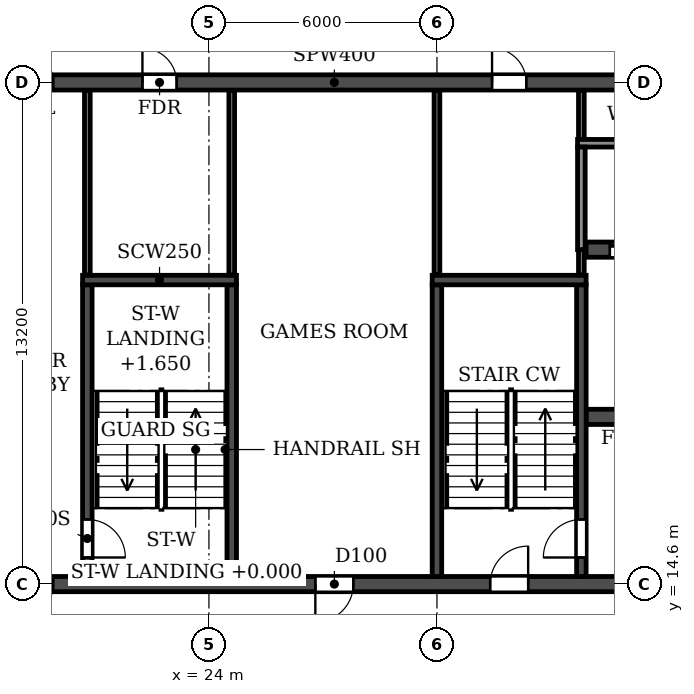
"""IFC4 building model, lengths in metres.
Left out: names, types, materials, properties, quantities, classifications, styles, units other than length and angle.
Written with IfcOpenShell. Run it as: python <this file> out.ifc"""

import sys

from ifc_helpers import new_model, si_unit, direction, frame, frame_2d, origin, place, context, subcontext, project, spatial, rectangle, extrude, element, fill, save


model = new_model("IFC4")
c1 = context("Model", 3, precision=1e-05, world=origin(), true_north=direction((0.0, 1.0)))
c2 = subcontext(c1, "Body", "Model", "MODEL_VIEW")
j1 = project(units=[si_unit("LENGTHUNIT", "METRE"), si_unit("PLANEANGLEUNIT", "RADIAN")], contexts=[c1])
p1 = place(None, origin())
s1 = spatial("IfcSite", under=j1, at=p1, CompositionType="ELEMENT")
p2 = place(p1, origin())
s2 = spatial("IfcBuilding", under=s1, at=p2, CompositionType="ELEMENT")
p3 = place(p2, frame((0.0, 0.0, 208.2)))
s3 = spatial("IfcBuildingStorey", under=s2, at=p3, CompositionType="ELEMENT", Elevation=208.2)
p4 = place(p3, frame((18.2, 14.6, 0.0), z_axis=(0.0, 0.0, 1.0), x_axis=(1.0, 0.0, 0.0)))
e1 = element("IfcWall", 1, at=p4, inside=s3, PredefinedType="SOLIDWALL", context=c2, shape_type="SweptSolid", body=[
    extrude(rectangle(XDim=65.6, YDim=0.4, at=frame_2d((32.8, 0.0))), origin(), (0.0, 0.0, 1.0), 3.0),
])
p5 = place(p4, frame((0.7, 0.0, 0.0)))
e2 = element("IfcOpeningElement", 2, at=p5, cuts=e1, PredefinedType="OPENING", context=c2, shape_type="SweptSolid", body=[
    extrude(rectangle(XDim=1.0, YDim=2.1, at=frame_2d((0.5, 1.05))), frame((0.0, 0.21, 0.0), z_axis=(0.0, -1.0, 0.0), x_axis=(1.0, 0.0, 0.0)), (0.0, 0.0, 1.0), 0.42),
])
p6 = place(p4, frame((8.6, 0.0, 0.0)))
e3 = element("IfcOpeningElement", 3, at=p6, cuts=e1, PredefinedType="OPENING", context=c2, shape_type="SweptSolid", body=[
    extrude(rectangle(XDim=1.0, YDim=2.1, at=frame_2d((0.5, 1.05))), frame((0.0, 0.21, 0.0), z_axis=(0.0, -1.0, 0.0), x_axis=(1.0, 0.0, 0.0)), (0.0, 0.0, 1.0), 0.42),
])
p7 = place(p4, frame((13.2, 0.0, 0.0)))
e4 = element("IfcOpeningElement", 4, at=p7, cuts=e1, PredefinedType="OPENING", context=c2, shape_type="SweptSolid", body=[
    extrude(rectangle(XDim=1.0, YDim=2.1, at=frame_2d((0.5, 1.05))), frame((0.0, 0.21, 0.0), z_axis=(0.0, -1.0, 0.0), x_axis=(1.0, 0.0, 0.0)), (0.0, 0.0, 1.0), 0.42),
])
p8 = place(p4, frame((27.1, 0.0, 0.0)))
e5 = element("IfcOpeningElement", 5, at=p8, cuts=e1, PredefinedType="OPENING", context=c2, shape_type="SweptSolid", body=[
    extrude(rectangle(XDim=1.0, YDim=2.1, at=frame_2d((0.5, 1.05))), frame((0.0, 0.21, 0.0), z_axis=(0.0, -1.0, 0.0), x_axis=(1.0, 0.0, 0.0)), (0.0, 0.0, 1.0), 0.42),
])
p9 = place(p4, frame((32.3, 0.0, 0.0)))
e6 = element("IfcOpeningElement", 6, at=p9, cuts=e1, PredefinedType="OPENING", context=c2, shape_type="SweptSolid", body=[
    extrude(rectangle(XDim=1.0, YDim=2.1, at=frame_2d((0.5, 1.05))), frame((0.0, 0.21, 0.0), z_axis=(0.0, -1.0, 0.0), x_axis=(1.0, 0.0, 0.0)), (0.0, 0.0, 1.0), 0.42),
])
p10 = place(p4, frame((34.9, 0.0, 0.0)))
e7 = element("IfcOpeningElement", 7, at=p10, cuts=e1, PredefinedType="OPENING", context=c2, shape_type="SweptSolid", body=[
    extrude(rectangle(XDim=1.0, YDim=2.1, at=frame_2d((0.5, 1.05))), frame((0.0, 0.21, 0.0), z_axis=(0.0, -1.0, 0.0), x_axis=(1.0, 0.0, 0.0)), (0.0, 0.0, 1.0), 0.42),
])
p11 = place(p4, frame((38.8, 0.0, 0.0)))
e8 = element("IfcOpeningElement", 8, at=p11, cuts=e1, PredefinedType="OPENING", context=c2, shape_type="SweptSolid", body=[
    extrude(rectangle(XDim=1.0, YDim=2.1, at=frame_2d((0.5, 1.05))), frame((0.0, 0.21, 0.0), z_axis=(0.0, -1.0, 0.0), x_axis=(1.0, 0.0, 0.0)), (0.0, 0.0, 1.0), 0.42),
])
p12 = place(p4, frame((51.4, 0.0, 0.0)))
e9 = element("IfcOpeningElement", 9, at=p12, cuts=e1, PredefinedType="OPENING", context=c2, shape_type="SweptSolid", body=[
    extrude(rectangle(XDim=1.0, YDim=2.1, at=frame_2d((0.5, 1.05))), frame((0.0, 0.21, 0.0), z_axis=(0.0, -1.0, 0.0), x_axis=(1.0, 0.0, 0.0)), (0.0, 0.0, 1.0), 0.42),
])
p13 = place(p4, frame((56.0, 0.0, 0.0)))
e10 = element("IfcOpeningElement", 10, at=p13, cuts=e1, PredefinedType="OPENING", context=c2, shape_type="SweptSolid", body=[
    extrude(rectangle(XDim=1.0, YDim=2.1, at=frame_2d((0.5, 1.05))), frame((0.0, 0.21, 0.0), z_axis=(0.0, -1.0, 0.0), x_axis=(1.0, 0.0, 0.0)), (0.0, 0.0, 1.0), 0.42),
])
p14 = place(p4, frame((63.9, 0.0, 0.0)))
e11 = element("IfcOpeningElement", 11, at=p14, cuts=e1, PredefinedType="OPENING", context=c2, shape_type="SweptSolid", body=[
    extrude(rectangle(XDim=1.0, YDim=2.1, at=frame_2d((0.5, 1.05))), frame((0.0, 0.21, 0.0), z_axis=(0.0, -1.0, 0.0), x_axis=(1.0, 0.0, 0.0)), (0.0, 0.0, 1.0), 0.42),
])
p15 = place(p3, frame((18.2, 27.8, 0.0), z_axis=(0.0, 0.0, 1.0), x_axis=(1.0, 0.0, 0.0)))
e12 = element("IfcWall", 12, at=p15, inside=s3, PredefinedType="SOLIDWALL", context=c2, shape_type="SweptSolid", body=[
    extrude(rectangle(XDim=65.6, YDim=0.4, at=frame_2d((32.8, 0.0))), origin(), (0.0, 0.0, 1.0), 3.0),
])
p16 = place(p15, frame((0.7, 0.0, 0.0)))
e13 = element("IfcOpeningElement", 13, at=p16, cuts=e12, PredefinedType="OPENING", context=c2, shape_type="SweptSolid", body=[
    extrude(rectangle(XDim=1.0, YDim=2.1, at=frame_2d((0.5, 1.05))), frame((0.0, 0.21, 0.0), z_axis=(0.0, -1.0, 0.0), x_axis=(1.0, 0.0, 0.0)), (0.0, 0.0, 1.0), 0.42),
])
p17 = place(p15, frame((4.05, 0.0, 0.0)))
e14 = element("IfcOpeningElement", 14, at=p17, cuts=e12, PredefinedType="OPENING", context=c2, shape_type="SweptSolid", body=[
    extrude(rectangle(XDim=0.9, YDim=2.1, at=frame_2d((0.45, 1.05))), frame((0.0, 0.21, 0.0), z_axis=(0.0, -1.0, 0.0), x_axis=(1.0, 0.0, 0.0)), (0.0, 0.0, 1.0), 0.42),
])
p18 = place(p15, frame((13.25, 0.0, 0.0)))
e15 = element("IfcOpeningElement", 15, at=p18, cuts=e12, PredefinedType="OPENING", context=c2, shape_type="SweptSolid", body=[
    extrude(rectangle(XDim=0.9, YDim=2.1, at=frame_2d((0.45, 1.05))), frame((0.0, 0.21, 0.0), z_axis=(0.0, -1.0, 0.0), x_axis=(1.0, 0.0, 0.0)), (0.0, 0.0, 1.0), 0.42),
])
p19 = place(p15, frame((17.7, 0.0, 0.0)))
e16 = element("IfcOpeningElement", 16, at=p19, cuts=e12, PredefinedType="OPENING", context=c2, shape_type="SweptSolid", body=[
    extrude(rectangle(XDim=1.0, YDim=2.1, at=frame_2d((0.5, 1.05))), frame((0.0, 0.21, 0.0), z_axis=(0.0, -1.0, 0.0), x_axis=(1.0, 0.0, 0.0)), (0.0, 0.0, 1.0), 0.42),
])
p20 = place(p15, frame((22.9, 0.0, 0.0)))
e17 = element("IfcOpeningElement", 17, at=p20, cuts=e12, PredefinedType="OPENING", context=c2, shape_type="SweptSolid", body=[
    extrude(rectangle(XDim=1.0, YDim=2.1, at=frame_2d((0.5, 1.05))), frame((0.0, 0.21, 0.0), z_axis=(0.0, -1.0, 0.0), x_axis=(1.0, 0.0, 0.0)), (0.0, 0.0, 1.0), 0.42),
])
p21 = place(p15, frame((29.4, 0.0, 0.0)))
e18 = element("IfcOpeningElement", 18, at=p21, cuts=e12, PredefinedType="OPENING", context=c2, shape_type="SweptSolid", body=[
    extrude(rectangle(XDim=1.0, YDim=2.1, at=frame_2d((0.5, 1.05))), frame((0.0, 0.21, 0.0), z_axis=(0.0, -1.0, 0.0), x_axis=(1.0, 0.0, 0.0)), (0.0, 0.0, 1.0), 0.42),
])
p22 = place(p15, frame((32.3, 0.0, 0.0)))
e19 = element("IfcOpeningElement", 19, at=p22, cuts=e12, PredefinedType="OPENING", context=c2, shape_type="SweptSolid", body=[
    extrude(rectangle(XDim=1.0, YDim=2.1, at=frame_2d((0.5, 1.05))), frame((0.0, 0.21, 0.0), z_axis=(0.0, -1.0, 0.0), x_axis=(1.0, 0.0, 0.0)), (0.0, 0.0, 1.0), 0.42),
])
p23 = place(p15, frame((35.2, 0.0, 0.0)))
e20 = element("IfcOpeningElement", 20, at=p23, cuts=e12, PredefinedType="OPENING", context=c2, shape_type="SweptSolid", body=[
    extrude(rectangle(XDim=1.0, YDim=2.1, at=frame_2d((0.5, 1.05))), frame((0.0, 0.21, 0.0), z_axis=(0.0, -1.0, 0.0), x_axis=(1.0, 0.0, 0.0)), (0.0, 0.0, 1.0), 0.42),
])
p24 = place(p15, frame((37.8, 0.0, 0.0)))
e21 = element("IfcOpeningElement", 21, at=p24, cuts=e12, PredefinedType="OPENING", context=c2, shape_type="SweptSolid", body=[
    extrude(rectangle(XDim=1.0, YDim=2.1, at=frame_2d((0.5, 1.05))), frame((0.0, 0.21, 0.0), z_axis=(0.0, -1.0, 0.0), x_axis=(1.0, 0.0, 0.0)), (0.0, 0.0, 1.0), 0.42),
])
p25 = place(p15, frame((40.4, 0.0, 0.0)))
e22 = element("IfcOpeningElement", 22, at=p25, cuts=e12, PredefinedType="OPENING", context=c2, shape_type="SweptSolid", body=[
    extrude(rectangle(XDim=1.0, YDim=2.1, at=frame_2d((0.5, 1.05))), frame((0.0, 0.21, 0.0), z_axis=(0.0, -1.0, 0.0), x_axis=(1.0, 0.0, 0.0)), (0.0, 0.0, 1.0), 0.42),
])
p26 = place(p15, frame((43.0, 0.0, 0.0)))
e23 = element("IfcOpeningElement", 23, at=p26, cuts=e12, PredefinedType="OPENING", context=c2, shape_type="SweptSolid", body=[
    extrude(rectangle(XDim=1.0, YDim=2.1, at=frame_2d((0.5, 1.05))), frame((0.0, 0.21, 0.0), z_axis=(0.0, -1.0, 0.0), x_axis=(1.0, 0.0, 0.0)), (0.0, 0.0, 1.0), 0.42),
])
p27 = place(p15, frame((46.9, 0.0, 0.0)))
e24 = element("IfcOpeningElement", 24, at=p27, cuts=e12, PredefinedType="OPENING", context=c2, shape_type="SweptSolid", body=[
    extrude(rectangle(XDim=1.0, YDim=2.1, at=frame_2d((0.5, 1.05))), frame((0.0, 0.21, 0.0), z_axis=(0.0, -1.0, 0.0), x_axis=(1.0, 0.0, 0.0)), (0.0, 0.0, 1.0), 0.42),
])
p28 = place(p15, frame((51.45, 0.0, 0.0)))
e25 = element("IfcOpeningElement", 25, at=p28, cuts=e12, PredefinedType="OPENING", context=c2, shape_type="SweptSolid", body=[
    extrude(rectangle(XDim=0.9, YDim=2.1, at=frame_2d((0.45, 1.05))), frame((0.0, 0.21, 0.0), z_axis=(0.0, -1.0, 0.0), x_axis=(1.0, 0.0, 0.0)), (0.0, 0.0, 1.0), 0.42),
])
p29 = place(p15, frame((60.65, 0.0, 0.0)))
e26 = element("IfcOpeningElement", 26, at=p29, cuts=e12, PredefinedType="OPENING", context=c2, shape_type="SweptSolid", body=[
    extrude(rectangle(XDim=0.9, YDim=2.1, at=frame_2d((0.45, 1.05))), frame((0.0, 0.21, 0.0), z_axis=(0.0, -1.0, 0.0), x_axis=(1.0, 0.0, 0.0)), (0.0, 0.0, 1.0), 0.42),
])
p30 = place(p15, frame((63.9, 0.0, 0.0)))
e27 = element("IfcOpeningElement", 27, at=p30, cuts=e12, PredefinedType="OPENING", context=c2, shape_type="SweptSolid", body=[
    extrude(rectangle(XDim=1.0, YDim=2.1, at=frame_2d((0.5, 1.05))), frame((0.0, 0.21, 0.0), z_axis=(0.0, -1.0, 0.0), x_axis=(1.0, 0.0, 0.0)), (0.0, 0.0, 1.0), 0.42),
])
p31 = place(p3, frame((33.925, 19.0, 0.0), z_axis=(0.0, 0.0, 1.0), x_axis=(1.0, 0.0, 0.0)))
e28 = element("IfcWall", 28, at=p31, inside=s3, PredefinedType="SOLIDWALL", context=c2, shape_type="SweptSolid", body=[
    extrude(rectangle(XDim=34.15, YDim=0.4, at=frame_2d((17.075, 0.0))), origin(), (0.0, 0.0, 1.0), 3.0),
])
p32 = place(p31, frame((16.175, 0.0, 0.0)))
e29 = element("IfcOpeningElement", 29, at=p32, cuts=e28, PredefinedType="OPENING", context=c2, shape_type="SweptSolid", body=[
    extrude(rectangle(XDim=1.8, YDim=2.1, at=frame_2d((0.9, 1.05))), frame((0.0, 0.21, 0.0), z_axis=(0.0, -1.0, 0.0), x_axis=(1.0, 0.0, 0.0)), (0.0, 0.0, 1.0), 0.42),
])
p33 = place(p31, frame((1.525, 0.0, 0.0)))
e30 = element("IfcOpeningElement", 30, at=p33, cuts=e28, PredefinedType="OPENING", context=c2, shape_type="SweptSolid", body=[
    extrude(rectangle(XDim=1.8, YDim=2.1, at=frame_2d((0.9, 1.05))), frame((0.0, 0.21, 0.0), z_axis=(0.0, -1.0, 0.0), x_axis=(1.0, 0.0, 0.0)), (0.0, 0.0, 1.0), 0.42),
])
p34 = place(p31, frame((30.825, 0.0, 0.0)))
e31 = element("IfcOpeningElement", 31, at=p34, cuts=e28, PredefinedType="OPENING", context=c2, shape_type="SweptSolid", body=[
    extrude(rectangle(XDim=1.8, YDim=2.1, at=frame_2d((0.9, 1.05))), frame((0.0, 0.21, 0.0), z_axis=(0.0, -1.0, 0.0), x_axis=(1.0, 0.0, 0.0)), (0.0, 0.0, 1.0), 0.42),
])
p35 = place(p3, frame((33.925, 23.4, 0.0), z_axis=(0.0, 0.0, 1.0), x_axis=(1.0, 0.0, 0.0)))
e32 = element("IfcWall", 32, at=p35, inside=s3, PredefinedType="SOLIDWALL", context=c2, shape_type="SweptSolid", body=[
    extrude(rectangle(XDim=34.15, YDim=0.4, at=frame_2d((17.075, 0.0))), origin(), (0.0, 0.0, 1.0), 3.0),
])
p36 = place(p35, frame((16.175, 0.0, 0.0)))
e33 = element("IfcOpeningElement", 33, at=p36, cuts=e32, PredefinedType="OPENING", context=c2, shape_type="SweptSolid", body=[
    extrude(rectangle(XDim=1.8, YDim=2.1, at=frame_2d((0.9, 1.05))), frame((0.0, 0.21, 0.0), z_axis=(0.0, -1.0, 0.0), x_axis=(1.0, 0.0, 0.0)), (0.0, 0.0, 1.0), 0.42),
])
p37 = place(p35, frame((0.625, 0.0, 0.0)))
e34 = element("IfcOpeningElement", 34, at=p37, cuts=e32, PredefinedType="OPENING", context=c2, shape_type="SweptSolid", body=[
    extrude(rectangle(XDim=1.1, YDim=2.1, at=frame_2d((0.55, 1.05))), frame((0.0, 0.21, 0.0), z_axis=(0.0, -1.0, 0.0), x_axis=(1.0, 0.0, 0.0)), (0.0, 0.0, 1.0), 0.42),
])
p38 = place(p35, frame((3.225, 0.0, 0.0)))
e35 = element("IfcOpeningElement", 35, at=p38, cuts=e32, PredefinedType="OPENING", context=c2, shape_type="SweptSolid", body=[
    extrude(rectangle(XDim=1.1, YDim=2.1, at=frame_2d((0.55, 1.05))), frame((0.0, 0.21, 0.0), z_axis=(0.0, -1.0, 0.0), x_axis=(1.0, 0.0, 0.0)), (0.0, 0.0, 1.0), 0.42),
])
p39 = place(p35, frame((5.825, 0.0, 0.0)))
e36 = element("IfcOpeningElement", 36, at=p39, cuts=e32, PredefinedType="OPENING", context=c2, shape_type="SweptSolid", body=[
    extrude(rectangle(XDim=1.1, YDim=2.1, at=frame_2d((0.55, 1.05))), frame((0.0, 0.21, 0.0), z_axis=(0.0, -1.0, 0.0), x_axis=(1.0, 0.0, 0.0)), (0.0, 0.0, 1.0), 0.42),
])
p40 = place(p35, frame((8.425, 0.0, 0.0)))
e37 = element("IfcOpeningElement", 37, at=p40, cuts=e32, PredefinedType="OPENING", context=c2, shape_type="SweptSolid", body=[
    extrude(rectangle(XDim=1.1, YDim=2.1, at=frame_2d((0.55, 1.05))), frame((0.0, 0.21, 0.0), z_axis=(0.0, -1.0, 0.0), x_axis=(1.0, 0.0, 0.0)), (0.0, 0.0, 1.0), 0.42),
])
p41 = place(p35, frame((11.025, 0.0, 0.0)))
e38 = element("IfcOpeningElement", 38, at=p41, cuts=e32, PredefinedType="OPENING", context=c2, shape_type="SweptSolid", body=[
    extrude(rectangle(XDim=1.1, YDim=2.1, at=frame_2d((0.55, 1.05))), frame((0.0, 0.21, 0.0), z_axis=(0.0, -1.0, 0.0), x_axis=(1.0, 0.0, 0.0)), (0.0, 0.0, 1.0), 0.42),
])
p42 = place(p35, frame((13.625, 0.0, 0.0)))
e39 = element("IfcOpeningElement", 39, at=p42, cuts=e32, PredefinedType="OPENING", context=c2, shape_type="SweptSolid", body=[
    extrude(rectangle(XDim=1.1, YDim=2.1, at=frame_2d((0.55, 1.05))), frame((0.0, 0.21, 0.0), z_axis=(0.0, -1.0, 0.0), x_axis=(1.0, 0.0, 0.0)), (0.0, 0.0, 1.0), 0.42),
])
p43 = place(p35, frame((27.225, 0.0, 0.0)))
e40 = element("IfcOpeningElement", 40, at=p43, cuts=e32, PredefinedType="OPENING", context=c2, shape_type="SweptSolid", body=[
    extrude(rectangle(XDim=1.1, YDim=2.1, at=frame_2d((0.55, 1.05))), frame((0.0, 0.21, 0.0), z_axis=(0.0, -1.0, 0.0), x_axis=(1.0, 0.0, 0.0)), (0.0, 0.0, 1.0), 0.42),
])
p44 = place(p3, frame((30.0, 14.8, 0.0), z_axis=(0.0, 0.0, 1.0), x_axis=(0.0, 1.0, 0.0)))
e41 = element("IfcWall", 41, at=p44, inside=s3, PredefinedType="SOLIDWALL", context=c2, shape_type="SweptSolid", body=[
    extrude(rectangle(XDim=7.675, YDim=0.25, at=frame_2d((3.837, 0.0))), origin(), (0.0, 0.0, 1.0), 3.0),
])
p45 = place(p3, frame((33.8, 14.8, 0.0), z_axis=(0.0, 0.0, 1.0), x_axis=(0.0, 1.0, 0.0)))
e42 = element("IfcWall", 42, at=p45, inside=s3, PredefinedType="SOLIDWALL", context=c2, shape_type="SweptSolid", body=[
    extrude(rectangle(XDim=7.675, YDim=0.25, at=frame_2d((3.837, 0.0))), origin(), (0.0, 0.0, 1.0), 3.0),
])
p46 = place(p45, frame((0.5, 0.0, 0.0)))
e43 = element("IfcOpeningElement", 43, at=p46, cuts=e42, PredefinedType="OPENING", context=c2, shape_type="SweptSolid", body=[
    extrude(rectangle(XDim=1.0, YDim=2.1, at=frame_2d((0.5, 1.05))), frame((0.0, 0.135, 0.0), z_axis=(0.0, -1.0, 0.0), x_axis=(1.0, 0.0, 0.0)), (0.0, 0.0, 1.0), 0.27),
])
p47 = place(p3, frame((29.875, 22.6, 0.0), z_axis=(0.0, 0.0, 1.0), x_axis=(1.0, 0.0, 0.0)))
e44 = element("IfcWall", 44, at=p47, inside=s3, PredefinedType="SOLIDWALL", context=c2, shape_type="SweptSolid", body=[
    extrude(rectangle(XDim=4.05, YDim=0.25, at=frame_2d((2.025, 0.0))), origin(), (0.0, 0.0, 1.0), 3.0),
])
p48 = place(p3, frame((20.8, 14.8, 0.0), z_axis=(0.0, 0.0, 1.0), x_axis=(0.0, 1.0, 0.0)))
e45 = element("IfcWall", 45, at=p48, inside=s3, PredefinedType="SOLIDWALL", context=c2, shape_type="SweptSolid", body=[
    extrude(rectangle(XDim=7.675, YDim=0.25, at=frame_2d((3.837, 0.0))), origin(), (0.0, 0.0, 1.0), 3.0),
])
p49 = place(p48, frame((0.5, 0.0, 0.0)))
e46 = element("IfcOpeningElement", 46, at=p49, cuts=e45, PredefinedType="OPENING", context=c2, shape_type="SweptSolid", body=[
    extrude(rectangle(XDim=1.0, YDim=2.1, at=frame_2d((0.5, 1.05))), frame((0.0, 0.135, 0.0), z_axis=(0.0, -1.0, 0.0), x_axis=(1.0, 0.0, 0.0)), (0.0, 0.0, 1.0), 0.27),
])
p50 = place(p3, frame((24.6, 14.8, 0.0), z_axis=(0.0, 0.0, 1.0), x_axis=(0.0, 1.0, 0.0)))
e47 = element("IfcWall", 47, at=p50, inside=s3, PredefinedType="SOLIDWALL", context=c2, shape_type="SweptSolid", body=[
    extrude(rectangle(XDim=7.675, YDim=0.25, at=frame_2d((3.837, 0.0))), origin(), (0.0, 0.0, 1.0), 3.0),
])
p51 = place(p3, frame((20.675, 22.6, 0.0), z_axis=(0.0, 0.0, 1.0), x_axis=(1.0, 0.0, 0.0)))
e48 = element("IfcWall", 48, at=p51, inside=s3, PredefinedType="SOLIDWALL", context=c2, shape_type="SweptSolid", body=[
    extrude(rectangle(XDim=4.05, YDim=0.25, at=frame_2d((2.025, 0.0))), origin(), (0.0, 0.0, 1.0), 3.0),
])
for number, where, z_axis, x_axis in (
    (49, (20.8, 22.735, 0.0), (0.0, 0.0, 1.0), (0.0, 1.0, 0.0)),
    (50, (24.6, 22.735, 0.0), (0.0, 0.0, 1.0), (0.0, 1.0, 0.0)),
    (51, (30.0, 22.735, 0.0), (0.0, 0.0, 1.0), (0.0, 1.0, 0.0)),
):
    element("IfcWall", number, at=place(p3, frame(where, z_axis=z_axis, x_axis=x_axis)), inside=s3, PredefinedType="PARTITIONING", context=c2, shape_type="SweptSolid", body=[
        extrude(rectangle(XDim=4.855, YDim=0.15, at=frame_2d((2.427, 0.0))), origin(), (0.0, 0.0, 1.0), 3.0),
    ])
p52 = place(p3, frame((33.8, 22.735, 0.0), z_axis=(0.0, 0.0, 1.0), x_axis=(0.0, 1.0, 0.0)))
e52 = element("IfcWall", 52, at=p52, inside=s3, PredefinedType="PARTITIONING", context=c2, shape_type="SweptSolid", body=[
    extrude(rectangle(XDim=0.665, YDim=0.15, at=frame_2d((0.333, 0.0))), origin(), (0.0, 0.0, 1.0), 3.0),
])
p53 = place(p3, frame((33.8, 26.3, 0.0), z_axis=(0.0, 0.0, 1.0), x_axis=(0.0, 1.0, 0.0)))
e53 = element("IfcWall", 53, at=p53, inside=s3, PredefinedType="PARTITIONING", context=c2, shape_type="SweptSolid", body=[
    extrude(rectangle(XDim=1.29, YDim=0.15, at=frame_2d((0.645, 0.0))), origin(), (0.0, 0.0, 1.0), 3.0),
])
p54 = place(p3, frame((33.7, 26.2, 0.0), z_axis=(0.0, 0.0, 1.0), x_axis=(1.0, 0.0, 0.0)))
e54 = element("IfcWall", 54, at=p54, inside=s3, PredefinedType="PARTITIONING", context=c2, shape_type="SweptSolid", body=[
    extrude(rectangle(XDim=10.4, YDim=0.2, at=frame_2d((5.2, 0.0))), origin(), (0.0, 0.0, 1.0), 3.0),
])
p55 = place(p3, frame((33.8, 23.4, 0.0), z_axis=(0.0, 0.0, 1.0), x_axis=(0.0, 1.0, 0.0)))
e55 = element("IfcWall", 55, at=p55, inside=s3, PredefinedType="PARTITIONING", context=c2, shape_type="SweptSolid", body=[
    extrude(rectangle(XDim=2.7, YDim=0.2, at=frame_2d((1.35, 0.0))), origin(), (0.0, 0.0, 1.0), 3.0),
])
p56 = place(p16, origin())
e56 = element("IfcDoor", 56, at=p56, inside=s3, OperationType="SINGLE_SWING_LEFT", PredefinedType="DOOR", context=c2, shape_type="SweptSolid", body=[
    extrude(rectangle(XDim=1.0, YDim=2.1, at=frame_2d((0.5, 1.05))), frame((0.0, 0.025, 0.0), z_axis=(0.0, -1.0, 0.0), x_axis=(1.0, 0.0, 0.0)), (0.0, 0.0, 1.0), 0.05),
])
fill(e13, e56)
p57 = place(p17, origin())
e57 = element("IfcDoor", 57, at=p57, inside=s3, OperationType="SINGLE_SWING_LEFT", PredefinedType="DOOR", context=c2, shape_type="SweptSolid", body=[
    extrude(rectangle(XDim=0.9, YDim=2.1, at=frame_2d((0.45, 1.05))), frame((0.0, 0.025, 0.0), z_axis=(0.0, -1.0, 0.0), x_axis=(1.0, 0.0, 0.0)), (0.0, 0.0, 1.0), 0.05),
])
fill(e14, e57)
p58 = place(p18, origin())
e58 = element("IfcDoor", 58, at=p58, inside=s3, OperationType="SINGLE_SWING_LEFT", PredefinedType="DOOR", context=c2, shape_type="SweptSolid", body=[
    extrude(rectangle(XDim=0.9, YDim=2.1, at=frame_2d((0.45, 1.05))), frame((0.0, 0.025, 0.0), z_axis=(0.0, -1.0, 0.0), x_axis=(1.0, 0.0, 0.0)), (0.0, 0.0, 1.0), 0.05),
])
fill(e15, e58)
p59 = place(p5, frame((1.0, 0.0, 0.0), z_axis=(0.0, 0.0, 1.0), x_axis=(-1.0, 0.0, 0.0)))
e59 = element("IfcDoor", 59, at=p59, inside=s3, OperationType="SINGLE_SWING_RIGHT", PredefinedType="DOOR", context=c2, shape_type="SweptSolid", body=[
    extrude(rectangle(XDim=1.0, YDim=2.1, at=frame_2d((0.5, 1.05))), frame((0.0, 0.025, 0.0), z_axis=(0.0, -1.0, 0.0), x_axis=(1.0, 0.0, 0.0)), (0.0, 0.0, 1.0), 0.05),
])
fill(e2, e59)
p60 = place(p6, frame((1.0, 0.0, 0.0), z_axis=(0.0, 0.0, 1.0), x_axis=(-1.0, 0.0, 0.0)))
e60 = element("IfcDoor", 60, at=p60, inside=s3, OperationType="SINGLE_SWING_RIGHT", PredefinedType="DOOR", context=c2, shape_type="SweptSolid", body=[
    extrude(rectangle(XDim=1.0, YDim=2.1, at=frame_2d((0.5, 1.05))), frame((0.0, 0.025, 0.0), z_axis=(0.0, -1.0, 0.0), x_axis=(1.0, 0.0, 0.0)), (0.0, 0.0, 1.0), 0.05),
])
fill(e3, e60)
p61 = place(p7, origin())
e61 = element("IfcDoor", 61, at=p61, inside=s3, OperationType="SINGLE_SWING_RIGHT", PredefinedType="DOOR", context=c2, shape_type="SweptSolid", body=[
    extrude(rectangle(XDim=1.0, YDim=2.1, at=frame_2d((0.5, 1.05))), frame((0.0, 0.025, 0.0), z_axis=(0.0, -1.0, 0.0), x_axis=(1.0, 0.0, 0.0)), (0.0, 0.0, 1.0), 0.05),
])
fill(e4, e61)
p62 = place(p46, origin())
e62 = element("IfcDoor", 62, at=p62, inside=s3, OperationType="SINGLE_SWING_LEFT", PredefinedType="DOOR", context=c2, shape_type="SweptSolid", body=[
    extrude(rectangle(XDim=1.0, YDim=2.1, at=frame_2d((0.5, 1.05))), frame((0.0, 0.025, 0.0), z_axis=(0.0, -1.0, 0.0), x_axis=(1.0, 0.0, 0.0)), (0.0, 0.0, 1.0), 0.05),
])
fill(e43, e62)
p63 = place(p37, origin())
e63 = element("IfcDoor", 63, at=p63, inside=s3, OperationType="DOUBLE_DOOR_SLIDING", PredefinedType="DOOR", context=c2, shape_type="SweptSolid", body=[
    extrude(rectangle(XDim=1.1, YDim=2.1, at=frame_2d((0.55, 1.05))), frame((0.0, 0.025, 0.0), z_axis=(0.0, -1.0, 0.0), x_axis=(1.0, 0.0, 0.0)), (0.0, 0.0, 1.0), 0.05),
])
fill(e34, e63)
p64 = place(p49, frame((1.0, 0.0, 0.0), z_axis=(0.0, 0.0, 1.0), x_axis=(-1.0, 0.0, 0.0)))
e64 = element("IfcDoor", 64, at=p64, inside=s3, OperationType="SINGLE_SWING_RIGHT", PredefinedType="DOOR", context=c2, shape_type="SweptSolid", body=[
    extrude(rectangle(XDim=1.0, YDim=2.1, at=frame_2d((0.5, 1.05))), frame((0.0, 0.025, 0.0), z_axis=(0.0, -1.0, 0.0), x_axis=(1.0, 0.0, 0.0)), (0.0, 0.0, 1.0), 0.05),
])
fill(e46, e64)
save(model, sys.argv[1])
